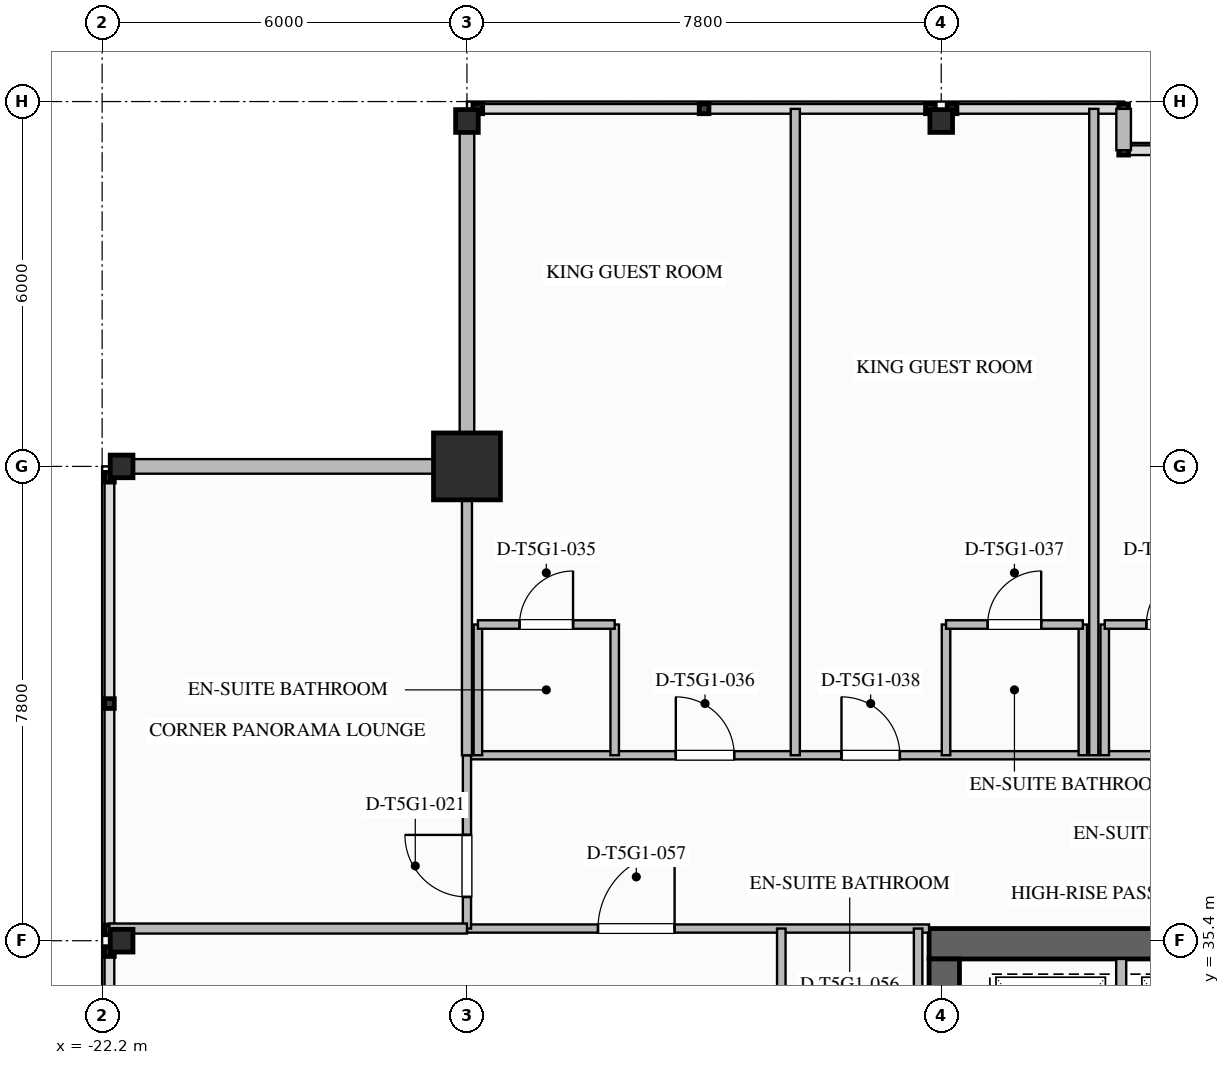
"""IFC4 building model, lengths in metres.
Left out: names, types, materials, properties, quantities, classifications, styles, units other than length and angle.
Written with IfcOpenShell. Run it as: python <this file> out.ifc"""

import sys

from ifc_helpers import new_model, si_unit, direction, frame, frame_2d, origin, origin_2d, place, context, subcontext, project, spatial, rectangle, i_section, extrude, element, fill, save


model = new_model("IFC4")
c1 = context("Model", 3, precision=1e-05, world=origin(), true_north=direction((0.0, 1.0)))
c2 = subcontext(c1, "Body", "Model", "MODEL_VIEW")
j1 = project(units=[si_unit("LENGTHUNIT", "METRE"), si_unit("PLANEANGLEUNIT", "RADIAN")], contexts=[c1])
p1 = place(None, origin())
s1 = spatial("IfcSite", under=j1, at=p1, CompositionType="ELEMENT")
p2 = place(p1, origin())
s2 = spatial("IfcBuilding", under=s1, at=p2, CompositionType="ELEMENT")
p3 = place(p2, frame((0.0, 0.0, 265.0)))
s3 = spatial("IfcBuildingStorey", under=s2, at=p3, CompositionType="ELEMENT", Elevation=265.0)
p4 = place(p3, frame((-8.6, 35.35, 0.0), z_axis=(0.0, 0.0, 1.0), x_axis=(1.0, 0.0, 0.0)))
e1 = element("IfcWall", 1, at=p4, inside=s3, PredefinedType="SHEAR", context=c2, shape_type="SweptSolid", body=[
    extrude(rectangle(XDim=17.2, YDim=0.5, at=frame_2d((8.6, 0.0))), origin(), (0.0, 0.0, 1.0), 3.65),
])
p5 = place(p3, frame((-8.35, 18.9, 0.0), z_axis=(0.0, 0.0, 1.0), x_axis=(0.0, 1.0, 0.0)))
e2 = element("IfcWall", 2, at=p5, inside=s3, PredefinedType="SHEAR", context=c2, shape_type="SweptSolid", body=[
    extrude(rectangle(XDim=16.2, YDim=0.5, at=frame_2d((8.1, 0.0))), origin(), (0.0, 0.0, 1.0), 3.65),
])
p6 = place(p3, frame((-16.2, 43.2, 0.0), z_axis=(0.0, 0.0, 1.0), x_axis=(1.0, 0.0, 0.0)))
e3 = element("IfcColumn", 3, at=p6, inside=s3, PredefinedType="COLUMN", context=c2, shape_type="SweptSolid", body=[
    extrude(rectangle(XDim=1.1, YDim=1.1, at=origin_2d()), origin(), (0.0, 0.0, 1.0), 3.65),
])
for number, where, z_axis, x_axis in (
    (4, (-21.88, 35.4, 0.0), (0.0, 0.0, 1.0), (1.0, 0.0, 0.0)),
    (5, (-21.88, 43.2, 0.0), (0.0, 0.0, 1.0), (1.0, 0.0, 0.0)),
    (6, (-16.2, 48.88, 0.0), (0.0, 0.0, 1.0), (0.0, 1.0, 0.0)),
    (7, (-8.4, 48.88, 0.0), (0.0, 0.0, 1.0), (0.0, 1.0, 0.0)),
):
    element("IfcColumn", number, at=place(p3, frame(where, z_axis=z_axis, x_axis=x_axis)), inside=s3, PredefinedType="COLUMN", context=c2, shape_type="SweptSolid", body=[
        extrude(i_section(OverallWidth=0.374, OverallDepth=0.372, WebThickness=0.016, FlangeThickness=0.026, FilletRadius=0.025, at=origin_2d()), origin(), (0.0, 0.0, 1.0), 3.647),
    ])
for number, where, z_axis, x_axis in (
    (8, (-22.08, 43.2, 0.0), (0.0, 0.0, 1.0), (1.0, 0.0, 0.0)),
    (9, (-16.2, 43.2, 0.0), (0.0, 0.0, 1.0), (0.0, 1.0, 0.0)),
):
    element("IfcWall", number, at=place(p3, frame(where, z_axis=z_axis, x_axis=x_axis)), inside=s3, PredefinedType="STANDARD", context=c2, shape_type="SweptSolid", body=[
        extrude(rectangle(XDim=5.88, YDim=0.24, at=frame_2d((2.94, 0.0))), origin(), (0.0, 0.0, 1.0), 2.779),
    ])
p7 = place(p3, frame((-5.4, 49.08, 0.0), z_axis=(0.0, 0.0, 1.0), x_axis=(0.0, -1.0, 0.0)))
e10 = element("IfcWall", 10, at=p7, inside=s3, PredefinedType="STANDARD", context=c2, shape_type="SweptSolid", body=[
    extrude(rectangle(XDim=0.68, YDim=0.24, at=frame_2d((0.34, 0.0))), origin(), (0.0, 0.0, 1.0), 3.39),
])
p8 = place(p3, frame((-5.44, 32.22, 0.0), z_axis=(0.0, 0.0, 1.0), x_axis=(0.0, 1.0, 0.0)))
e11 = element("IfcWall", 11, at=p8, inside=s3, PredefinedType="PARTITIONING", context=c2, shape_type="SweptSolid", body=[
    extrude(rectangle(XDim=2.88, YDim=0.165, at=frame_2d((1.44, 0.0))), origin(), (0.0, 0.0, 1.0), 3.39),
])
p9 = place(p3, frame((-16.2, 38.45, 0.0), z_axis=(0.0, 0.0, 1.0), x_axis=(1.0, 0.0, 0.0)))
e12 = element("IfcWall", 12, at=p9, inside=s3, PredefinedType="PARTITIONING", context=c2, shape_type="SweptSolid", body=[
    extrude(rectangle(XDim=38.28, YDim=0.135, at=frame_2d((19.14, 0.0))), origin(), (0.0, 0.0, 1.0), 3.39),
])
p10 = place(p9, frame((33.355, 0.0, 0.0)))
e13 = element("IfcOpeningElement", 13, at=p10, cuts=e12, PredefinedType="OPENING", context=c2, shape_type="SweptSolid", body=[
    extrude(rectangle(XDim=1.26, YDim=2.2, at=frame_2d((0.63, 1.1))), frame((0.0, 0.077, 0.0), z_axis=(0.0, -1.0, 0.0), x_axis=(1.0, 0.0, 0.0)), (0.0, 0.0, 1.0), 0.155),
])
p11 = place(p9, frame((3.435, 0.0, 0.0)))
e14 = element("IfcOpeningElement", 14, at=p11, cuts=e12, PredefinedType="OPENING", context=c2, shape_type="SweptSolid", body=[
    extrude(rectangle(XDim=0.96, YDim=2.15, at=frame_2d((0.48, 1.075))), frame((0.0, 0.077, 0.0), z_axis=(0.0, -1.0, 0.0), x_axis=(1.0, 0.0, 0.0)), (0.0, 0.0, 1.0), 0.155),
])
p12 = place(p9, frame((6.16, 0.0, 0.0)))
e15 = element("IfcOpeningElement", 15, at=p12, cuts=e12, PredefinedType="OPENING", context=c2, shape_type="SweptSolid", body=[
    extrude(rectangle(XDim=0.96, YDim=2.15, at=frame_2d((0.48, 1.075))), frame((0.0, 0.077, 0.0), z_axis=(0.0, -1.0, 0.0), x_axis=(1.0, 0.0, 0.0)), (0.0, 0.0, 1.0), 0.155),
])
p13 = place(p9, frame((13.99, 0.0, 0.0)))
e16 = element("IfcOpeningElement", 16, at=p13, cuts=e12, PredefinedType="OPENING", context=c2, shape_type="SweptSolid", body=[
    extrude(rectangle(XDim=0.96, YDim=2.15, at=frame_2d((0.48, 1.075))), frame((0.0, 0.077, 0.0), z_axis=(0.0, -1.0, 0.0), x_axis=(1.0, 0.0, 0.0)), (0.0, 0.0, 1.0), 0.155),
])
p14 = place(p9, frame((17.45, 0.0, 0.0)))
e17 = element("IfcOpeningElement", 17, at=p14, cuts=e12, PredefinedType="OPENING", context=c2, shape_type="SweptSolid", body=[
    extrude(rectangle(XDim=0.96, YDim=2.15, at=frame_2d((0.48, 1.075))), frame((0.0, 0.077, 0.0), z_axis=(0.0, -1.0, 0.0), x_axis=(1.0, 0.0, 0.0)), (0.0, 0.0, 1.0), 0.155),
])
p15 = place(p9, frame((25.281, 0.0, 0.0)))
e18 = element("IfcOpeningElement", 18, at=p15, cuts=e12, PredefinedType="OPENING", context=c2, shape_type="SweptSolid", body=[
    extrude(rectangle(XDim=0.96, YDim=2.15, at=frame_2d((0.48, 1.075))), frame((0.0, 0.077, 0.0), z_axis=(0.0, -1.0, 0.0), x_axis=(1.0, 0.0, 0.0)), (0.0, 0.0, 1.0), 0.155),
])
p16 = place(p9, frame((28.005, 0.0, 0.0)))
e19 = element("IfcOpeningElement", 19, at=p16, cuts=e12, PredefinedType="OPENING", context=c2, shape_type="SweptSolid", body=[
    extrude(rectangle(XDim=0.96, YDim=2.15, at=frame_2d((0.48, 1.075))), frame((0.0, 0.077, 0.0), z_axis=(0.0, -1.0, 0.0), x_axis=(1.0, 0.0, 0.0)), (0.0, 0.0, 1.0), 0.155),
])
p17 = place(p3, frame((-16.2, 35.6, 0.0), z_axis=(0.0, 0.0, 1.0), x_axis=(1.0, 0.0, 0.0)))
e20 = element("IfcWall", 20, at=p17, inside=s3, PredefinedType="PARTITIONING", context=c2, shape_type="SweptSolid", body=[
    extrude(rectangle(XDim=7.6, YDim=0.135, at=frame_2d((3.8, 0.0))), origin(), (0.0, 0.0, 1.0), 2.767),
])
p18 = place(p17, frame((2.155, 0.0, 0.0)))
e21 = element("IfcOpeningElement", 21, at=p18, cuts=e20, PredefinedType="OPENING", context=c2, shape_type="SweptSolid", body=[
    extrude(rectangle(XDim=1.26, YDim=2.2, at=frame_2d((0.63, 1.1))), frame((0.0, 0.077, 0.0), z_axis=(0.0, -1.0, 0.0), x_axis=(1.0, 0.0, 0.0)), (0.0, 0.0, 1.0), 0.155),
])
p19 = place(p3, frame((-16.2, 35.6, 0.0), z_axis=(0.0, 0.0, 1.0), x_axis=(0.0, 1.0, 0.0)))
e22 = element("IfcWall", 22, at=p19, inside=s3, PredefinedType="PARTITIONING", context=c2, shape_type="SweptSolid", body=[
    extrude(rectangle(XDim=2.85, YDim=0.135, at=frame_2d((1.425, 0.0))), origin(), (0.0, 0.0, 1.0), 2.764),
])
p20 = place(p19, frame((0.52, 0.0, 0.0)))
e23 = element("IfcOpeningElement", 23, at=p20, cuts=e22, PredefinedType="OPENING", context=c2, shape_type="SweptSolid", body=[
    extrude(rectangle(XDim=1.02, YDim=2.15, at=frame_2d((0.51, 1.075))), frame((0.0, 0.077, 0.0), z_axis=(0.0, -1.0, 0.0), x_axis=(1.0, 0.0, 0.0)), (0.0, 0.0, 1.0), 0.155),
])
p21 = place(p3, frame((-16.2, 38.45, 0.0), z_axis=(0.0, 0.0, 1.0), x_axis=(0.0, 1.0, 0.0)))
e24 = element("IfcWall", 24, at=p21, inside=s3, PredefinedType="PARTITIONING", context=c2, shape_type="SweptSolid", body=[
    extrude(rectangle(XDim=4.63, YDim=0.165, at=frame_2d((2.315, 0.0))), origin(), (0.0, 0.0, 1.0), 2.764),
])
p22 = place(p3, frame((-22.08, 35.6, 0.0), z_axis=(0.0, 0.0, 1.0), x_axis=(1.0, 0.0, 0.0)))
e25 = element("IfcWall", 25, at=p22, inside=s3, PredefinedType="PARTITIONING", context=c2, shape_type="SweptSolid", body=[
    extrude(rectangle(XDim=5.88, YDim=0.165, at=frame_2d((2.94, 0.0))), origin(), (0.0, 0.0, 1.0), 2.764),
])
p23 = place(p3, frame((-16.02, 38.45, 0.0), z_axis=(0.0, 0.0, 1.0), x_axis=(0.0, 1.0, 0.0)))
e26 = element("IfcWall", 26, at=p23, inside=s3, PredefinedType="PLUMBINGWALL", context=c2, shape_type="SweptSolid", body=[
    extrude(rectangle(XDim=2.15, YDim=0.14, at=frame_2d((1.075, 0.0))), origin(), (0.0, 0.0, 1.0), 2.764),
])
p24 = place(p3, frame((-13.77, 38.45, 0.0), z_axis=(0.0, 0.0, 1.0), x_axis=(0.0, 1.0, 0.0)))
e27 = element("IfcWall", 27, at=p24, inside=s3, PredefinedType="PLUMBINGWALL", context=c2, shape_type="SweptSolid", body=[
    extrude(rectangle(XDim=2.15, YDim=0.14, at=frame_2d((1.075, 0.0))), origin(), (0.0, 0.0, 1.0), 3.39),
])
p25 = place(p3, frame((-16.02, 40.6, 0.0), z_axis=(0.0, 0.0, 1.0), x_axis=(1.0, 0.0, 0.0)))
e28 = element("IfcWall", 28, at=p25, inside=s3, PredefinedType="PLUMBINGWALL", context=c2, shape_type="SweptSolid", body=[
    extrude(rectangle(XDim=2.25, YDim=0.14, at=frame_2d((1.125, 0.0))), origin(), (0.0, 0.0, 1.0), 3.39),
])
p26 = place(p25, frame((0.685, 0.0, 0.0)))
e29 = element("IfcOpeningElement", 29, at=p26, cuts=e28, PredefinedType="OPENING", context=c2, shape_type="SweptSolid", body=[
    extrude(rectangle(XDim=0.88, YDim=2.1, at=frame_2d((0.44, 1.05))), frame((0.0, 0.08, 0.0), z_axis=(0.0, -1.0, 0.0), x_axis=(1.0, 0.0, 0.0)), (0.0, 0.0, 1.0), 0.16),
])
p27 = place(p3, frame((-10.8, 38.45, 0.0), z_axis=(0.0, 0.0, 1.0), x_axis=(0.0, 1.0, 0.0)))
e30 = element("IfcWall", 30, at=p27, inside=s3, PredefinedType="PARTITIONING", context=c2, shape_type="SweptSolid", body=[
    extrude(rectangle(XDim=10.63, YDim=0.15, at=frame_2d((5.315, 0.0))), origin(), (0.0, 0.0, 1.0), 3.39),
])
p28 = place(p3, frame((-8.321, 38.45, 0.0), z_axis=(0.0, 0.0, 1.0), x_axis=(0.0, 1.0, 0.0)))
e31 = element("IfcWall", 31, at=p28, inside=s3, PredefinedType="PLUMBINGWALL", context=c2, shape_type="SweptSolid", body=[
    extrude(rectangle(XDim=2.15, YDim=0.14, at=frame_2d((1.075, 0.0))), origin(), (0.0, 0.0, 1.0), 2.767),
])
p29 = place(p3, frame((-6.071, 38.45, 0.0), z_axis=(0.0, 0.0, 1.0), x_axis=(0.0, 1.0, 0.0)))
e32 = element("IfcWall", 32, at=p29, inside=s3, PredefinedType="PLUMBINGWALL", context=c2, shape_type="SweptSolid", body=[
    extrude(rectangle(XDim=2.15, YDim=0.14, at=frame_2d((1.075, 0.0))), origin(), (0.0, 0.0, 1.0), 3.39),
])
p30 = place(p3, frame((-8.321, 40.6, 0.0), z_axis=(0.0, 0.0, 1.0), x_axis=(1.0, 0.0, 0.0)))
e33 = element("IfcWall", 33, at=p30, inside=s3, PredefinedType="PLUMBINGWALL", context=c2, shape_type="SweptSolid", body=[
    extrude(rectangle(XDim=2.25, YDim=0.14, at=frame_2d((1.125, 0.0))), origin(), (0.0, 0.0, 1.0), 3.39),
])
p31 = place(p30, frame((0.685, 0.0, 0.0)))
e34 = element("IfcOpeningElement", 34, at=p31, cuts=e33, PredefinedType="OPENING", context=c2, shape_type="SweptSolid", body=[
    extrude(rectangle(XDim=0.88, YDim=2.1, at=frame_2d((0.44, 1.05))), frame((0.0, 0.08, 0.0), z_axis=(0.0, -1.0, 0.0), x_axis=(1.0, 0.0, 0.0)), (0.0, 0.0, 1.0), 0.16),
])
p32 = place(p3, frame((-5.891, 38.45, 0.0), z_axis=(0.0, 0.0, 1.0), x_axis=(0.0, 1.0, 0.0)))
e35 = element("IfcWall", 35, at=p32, inside=s3, PredefinedType="PARTITIONING", context=c2, shape_type="SweptSolid", body=[
    extrude(rectangle(XDim=10.63, YDim=0.15, at=frame_2d((5.315, 0.0))), origin(), (0.0, 0.0, 1.0), 3.39),
])
p33 = place(p3, frame((-5.711, 38.45, 0.0), z_axis=(0.0, 0.0, 1.0), x_axis=(0.0, 1.0, 0.0)))
e36 = element("IfcWall", 36, at=p33, inside=s3, PredefinedType="PLUMBINGWALL", context=c2, shape_type="SweptSolid", body=[
    extrude(rectangle(XDim=2.15, YDim=0.14, at=frame_2d((1.075, 0.0))), origin(), (0.0, 0.0, 1.0), 3.39),
])
p34 = place(p3, frame((-5.711, 40.6, 0.0), z_axis=(0.0, 0.0, 1.0), x_axis=(1.0, 0.0, 0.0)))
e37 = element("IfcWall", 37, at=p34, inside=s3, PredefinedType="PLUMBINGWALL", context=c2, shape_type="SweptSolid", body=[
    extrude(rectangle(XDim=2.25, YDim=0.14, at=frame_2d((1.125, 0.0))), origin(), (0.0, 0.0, 1.0), 3.39),
])
p35 = place(p34, frame((0.685, 0.0, 0.0)))
e38 = element("IfcOpeningElement", 38, at=p35, cuts=e37, PredefinedType="OPENING", context=c2, shape_type="SweptSolid", body=[
    extrude(rectangle(XDim=0.88, YDim=2.1, at=frame_2d((0.44, 1.05))), frame((0.0, 0.08, 0.0), z_axis=(0.0, -1.0, 0.0), x_axis=(1.0, 0.0, 0.0)), (0.0, 0.0, 1.0), 0.16),
])
for number, where, z_axis, x_axis in (
    (39, (-11.03, 35.6, 0.0), (0.0, 0.0, 1.0), (0.0, -1.0, 0.0)),
    (40, (-8.78, 35.6, 0.0), (0.0, 0.0, 1.0), (0.0, -1.0, 0.0)),
):
    element("IfcWall", number, at=place(p3, frame(where, z_axis=z_axis, x_axis=x_axis)), inside=s3, PredefinedType="PLUMBINGWALL", context=c2, shape_type="SweptSolid", body=[
        extrude(rectangle(XDim=2.15, YDim=0.14, at=frame_2d((1.075, 0.0))), origin(), (0.0, 0.0, 1.0), 3.39),
    ])
p36 = place(p20, origin())
e41 = element("IfcDoor", 41, at=p36, inside=s3, OperationType="SINGLE_SWING_RIGHT", PredefinedType="DOOR", context=c2, shape_type="SweptSolid", body=[
    extrude(rectangle(XDim=1.02, YDim=2.15, at=frame_2d((0.51, 1.075))), frame((0.0, 0.025, 0.0), z_axis=(0.0, -1.0, 0.0), x_axis=(1.0, 0.0, 0.0)), (0.0, 0.0, 1.0), 0.05),
])
fill(e23, e41)
p37 = place(p26, origin())
e42 = element("IfcDoor", 42, at=p37, inside=s3, OperationType="SINGLE_SWING_RIGHT", PredefinedType="DOOR", context=c2, shape_type="SweptSolid", body=[
    extrude(rectangle(XDim=0.88, YDim=2.1, at=frame_2d((0.44, 1.05))), frame((0.0, 0.025, 0.0), z_axis=(0.0, -1.0, 0.0), x_axis=(1.0, 0.0, 0.0)), (0.0, 0.0, 1.0), 0.05),
])
fill(e29, e42)
p38 = place(p11, origin())
e43 = element("IfcDoor", 43, at=p38, inside=s3, OperationType="SINGLE_SWING_LEFT", PredefinedType="DOOR", context=c2, shape_type="SweptSolid", body=[
    extrude(rectangle(XDim=0.96, YDim=2.15, at=frame_2d((0.48, 1.075))), frame((0.0, 0.025, 0.0), z_axis=(0.0, -1.0, 0.0), x_axis=(1.0, 0.0, 0.0)), (0.0, 0.0, 1.0), 0.05),
])
fill(e14, e43)
p39 = place(p31, origin())
e44 = element("IfcDoor", 44, at=p39, inside=s3, OperationType="SINGLE_SWING_RIGHT", PredefinedType="DOOR", context=c2, shape_type="SweptSolid", body=[
    extrude(rectangle(XDim=0.88, YDim=2.1, at=frame_2d((0.44, 1.05))), frame((0.0, 0.025, 0.0), z_axis=(0.0, -1.0, 0.0), x_axis=(1.0, 0.0, 0.0)), (0.0, 0.0, 1.0), 0.05),
])
fill(e34, e44)
p40 = place(p12, origin())
e45 = element("IfcDoor", 45, at=p40, inside=s3, OperationType="SINGLE_SWING_LEFT", PredefinedType="DOOR", context=c2, shape_type="SweptSolid", body=[
    extrude(rectangle(XDim=0.96, YDim=2.15, at=frame_2d((0.48, 1.075))), frame((0.0, 0.025, 0.0), z_axis=(0.0, -1.0, 0.0), x_axis=(1.0, 0.0, 0.0)), (0.0, 0.0, 1.0), 0.05),
])
fill(e15, e45)
p41 = place(p35, origin())
e46 = element("IfcDoor", 46, at=p41, inside=s3, OperationType="SINGLE_SWING_RIGHT", PredefinedType="DOOR", context=c2, shape_type="SweptSolid", body=[
    extrude(rectangle(XDim=0.88, YDim=2.1, at=frame_2d((0.44, 1.05))), frame((0.0, 0.025, 0.0), z_axis=(0.0, -1.0, 0.0), x_axis=(1.0, 0.0, 0.0)), (0.0, 0.0, 1.0), 0.05),
])
fill(e38, e46)
p42 = place(p18, origin())
e47 = element("IfcDoor", 47, at=p42, inside=s3, OperationType="SINGLE_SWING_RIGHT", PredefinedType="DOOR", context=c2, shape_type="SweptSolid", body=[
    extrude(rectangle(XDim=1.26, YDim=2.2, at=frame_2d((0.63, 1.1))), frame((0.0, 0.025, 0.0), z_axis=(0.0, -1.0, 0.0), x_axis=(1.0, 0.0, 0.0)), (0.0, 0.0, 1.0), 0.05),
])
fill(e21, e47)
save(model, sys.argv[1])
